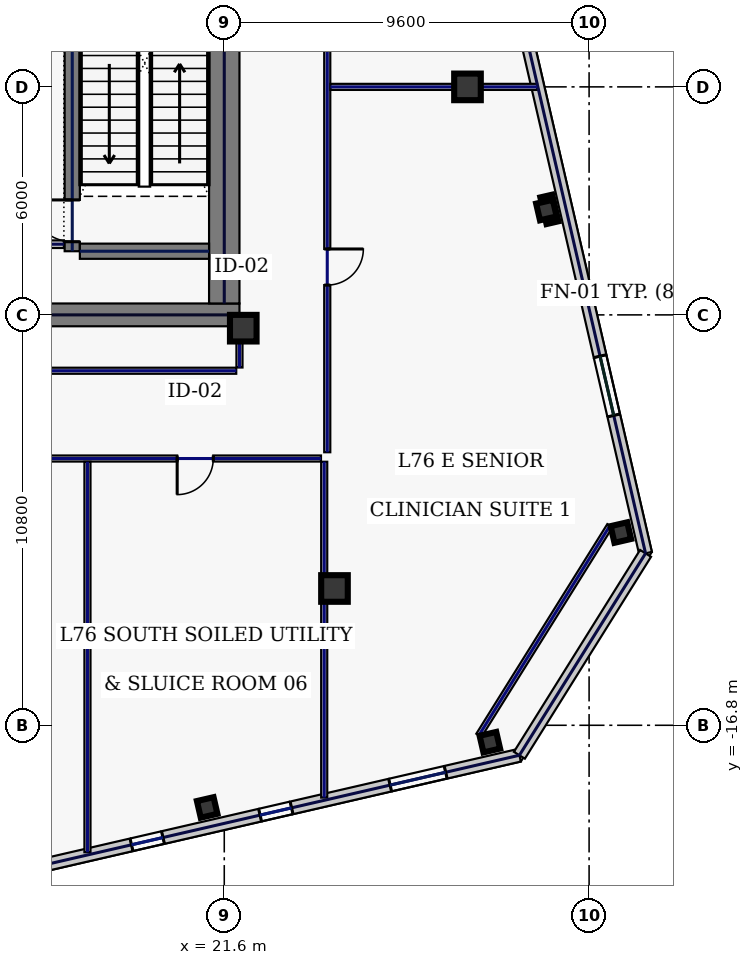
"""IFC4 building model, lengths in metres.
Left out: names, types, materials, properties, quantities, classifications, styles, units other than length and angle.
Written with IfcOpenShell. Run it as: python <this file> out.ifc"""

import sys

from ifc_helpers import new_model, si_unit, direction, frame, frame_2d, origin, origin_2d, place, context, subcontext, project, spatial, rectangle, hollow_rectangle, extrude, element, fill, save


model = new_model("IFC4")
c1 = context("Model", 3, precision=1e-05, world=origin(), true_north=direction((0.0, 1.0)))
c2 = subcontext(c1, "Body", "Model", "MODEL_VIEW")
j1 = project(units=[si_unit("LENGTHUNIT", "METRE"), si_unit("PLANEANGLEUNIT", "RADIAN")], contexts=[c1])
p1 = place(None, origin())
s1 = spatial("IfcSite", under=j1, at=p1, CompositionType="ELEMENT")
p2 = place(p1, origin())
s2 = spatial("IfcBuilding", under=s1, at=p2, CompositionType="ELEMENT")
p3 = place(p2, frame((0.0, 0.0, 325.0)))
s3 = spatial("IfcBuildingStorey", under=s2, at=p3, CompositionType="ELEMENT", Elevation=325.0)
p4 = place(p3, frame((10.5, -6.0, 0.0), z_axis=(0.0, 0.0, 1.0), x_axis=(1.0, 0.0, 0.0)))
e1 = element("IfcWall", 1, at=p4, inside=s3, PredefinedType="SHEAR", context=c2, shape_type="SweptSolid", body=[
    extrude(rectangle(XDim=11.5, YDim=0.6, at=frame_2d((5.75, 0.0))), origin(), (0.0, 0.0, 1.0), 3.74),
])
p5 = place(p3, frame((21.6, -5.7, 0.0), z_axis=(0.0, 0.0, 1.0), x_axis=(0.0, 1.0, 0.0)))
e2 = element("IfcWall", 2, at=p5, inside=s3, PredefinedType="SHEAR", context=c2, shape_type="SweptSolid", body=[
    extrude(rectangle(XDim=11.4, YDim=0.8, at=frame_2d((5.7, 0.0))), origin(), (0.0, 0.0, 1.0), 3.74),
])
p6 = place(p3, frame((17.6, -4.325, 0.0), z_axis=(0.0, 0.0, 1.0), x_axis=(0.0, 1.0, 0.0)))
e3 = element("IfcWall", 3, at=p6, inside=s3, PredefinedType="SHEAR", context=c2, shape_type="SweptSolid", body=[
    extrude(rectangle(XDim=8.65, YDim=0.4, at=frame_2d((4.325, 0.0))), origin(), (0.0, 0.0, 1.0), 3.74),
])
p7 = place(p6, frame((0.25, 0.0, 0.0)))
e4 = element("IfcOpeningElement", 4, at=p7, cuts=e3, PredefinedType="OPENING", context=c2, shape_type="SweptSolid", body=[
    extrude(rectangle(XDim=1.1, YDim=2.2, at=frame_2d((0.55, 1.1))), frame((0.0, 0.21, 0.0), z_axis=(0.0, -1.0, 0.0), x_axis=(1.0, 0.0, 0.0)), (0.0, 0.0, 1.0), 0.42),
])
p8 = place(p3, frame((17.8, -4.325, 0.0), z_axis=(0.0, 0.0, 1.0), x_axis=(1.0, 0.0, 0.0)))
e5 = element("IfcWall", 5, at=p8, inside=s3, PredefinedType="SHEAR", context=c2, shape_type="SweptSolid", body=[
    extrude(rectangle(XDim=3.4, YDim=0.4, at=frame_2d((1.7, 0.0))), origin(), (0.0, 0.0, 1.0), 3.74),
])
for number, where, z_axis, x_axis in (
    (6, (22.1, -6.35, 0.0), (0.0, 0.0, 1.0), (1.0, 0.0, 0.0)),
    (7, (24.5, -13.2, 0.0), (0.0, 0.0, 1.0), (1.0, 0.0, 0.0)),
    (8, (28.0, 0.0, 0.0), (0.0, 0.0, 1.0), (1.0, 0.0, 0.0)),
):
    element("IfcColumn", number, at=place(p3, frame(where, z_axis=z_axis, x_axis=x_axis)), inside=s3, PredefinedType="COLUMN", context=c2, shape_type="SweptSolid", body=[
        extrude(hollow_rectangle(XDim=0.7, YDim=0.7, WallThickness=0.032, at=origin_2d()), origin(), (0.0, 0.0, 1.0), 3.74),
    ])
for number, where, z_axis, x_axis in (
    (9, (21.15, -18.962, 0.0), (0.0, 0.0, 1.0), (0.974, 0.225, 0.0)),
    (10, (28.589, -17.245, 0.0), (0.0, 0.0, 1.0), (0.974, 0.225, 0.0)),
    (11, (32.036, -11.728, 0.0), (0.0, 0.0, 1.0), (0.974, 0.225, 0.0)),
    (12, (30.077, -3.241, 0.0), (0.0, 0.0, 1.0), (0.974, 0.225, 0.0)),
):
    element("IfcColumn", number, at=place(p3, frame(where, z_axis=z_axis, x_axis=x_axis)), inside=s3, PredefinedType="COLUMN", context=c2, shape_type="SweptSolid", body=[
        extrude(hollow_rectangle(XDim=0.45, YDim=0.45, WallThickness=0.022, at=origin_2d()), origin(), (0.0, 0.0, 1.0), 3.74),
    ])
p9 = place(p3, frame((12.445, -21.495, 0.0), z_axis=(0.0, 0.0, 1.0), x_axis=(0.974369392164, 0.224953967767, 0.0)))
e13 = element("IfcWall", 13, at=p9, inside=s3, PredefinedType="STANDARD", context=c2, shape_type="SweptSolid", body=[
    extrude(rectangle(XDim=17.366, YDim=0.34, at=frame_2d((8.683, 0.0))), origin(), (0.0, 0.0, 1.0), 3.74),
])
p10 = place(p9, frame((2.729, 0.0, 0.9)))
e14 = element("IfcOpeningElement", 14, at=p10, cuts=e13, PredefinedType="OPENING", context=c2, shape_type="SweptSolid", body=[
    extrude(rectangle(XDim=1.5, YDim=2.0, at=frame_2d((0.75, 1.0))), frame((0.0, 0.18, 0.0), z_axis=(0.0, -1.0, 0.0), x_axis=(1.0, 0.0, 0.0)), (0.0, 0.0, 1.0), 0.36),
])
p11 = place(p9, frame((6.89, 0.0, 0.9)))
e15 = element("IfcOpeningElement", 15, at=p11, cuts=e13, PredefinedType="OPENING", context=c2, shape_type="SweptSolid", body=[
    extrude(rectangle(XDim=0.85, YDim=1.85, at=frame_2d((0.425, 0.925))), frame((0.0, 0.18, 0.0), z_axis=(0.0, -1.0, 0.0), x_axis=(1.0, 0.0, 0.0)), (0.0, 0.0, 1.0), 0.36),
])
p12 = place(p9, frame((10.363, 0.0, 0.9)))
e16 = element("IfcOpeningElement", 16, at=p12, cuts=e13, PredefinedType="OPENING", context=c2, shape_type="SweptSolid", body=[
    extrude(rectangle(XDim=0.85, YDim=1.85, at=frame_2d((0.425, 0.925))), frame((0.0, 0.18, 0.0), z_axis=(0.0, -1.0, 0.0), x_axis=(1.0, 0.0, 0.0)), (0.0, 0.0, 1.0), 0.36),
])
p13 = place(p9, frame((13.875, 0.0, 0.9)))
e17 = element("IfcOpeningElement", 17, at=p13, cuts=e13, PredefinedType="OPENING", context=c2, shape_type="SweptSolid", body=[
    extrude(rectangle(XDim=1.5, YDim=2.0, at=frame_2d((0.75, 1.0))), frame((0.0, 0.18, 0.0), z_axis=(0.0, -1.0, 0.0), x_axis=(1.0, 0.0, 0.0)), (0.0, 0.0, 1.0), 0.36),
])
p14 = place(p3, frame((32.686, -12.276, 0.0), z_axis=(0.0, 0.0, 1.0), x_axis=(-0.224953091034, 0.974369594576, 0.0)))
e18 = element("IfcWall", 18, at=p14, inside=s3, PredefinedType="STANDARD", context=c2, shape_type="SweptSolid", body=[
    extrude(rectangle(XDim=36.2, YDim=0.34, at=frame_2d((18.1, 0.0))), origin(), (0.0, 0.0, 1.0), 3.74),
])
p15 = place(p14, frame((3.725, 0.0, 0.58)))
e19 = element("IfcOpeningElement", 19, at=p15, cuts=e18, PredefinedType="OPENING", context=c2, shape_type="SweptSolid", body=[
    extrude(rectangle(XDim=1.6, YDim=2.3, at=frame_2d((0.8, 1.15))), frame((0.0, 0.18, 0.0), z_axis=(0.0, -1.0, 0.0), x_axis=(1.0, 0.0, 0.0)), (0.0, 0.0, 1.0), 0.36),
])
p16 = place(p14, frame((13.875, 0.0, 0.75)))
e20 = element("IfcOpeningElement", 20, at=p16, cuts=e18, PredefinedType="OPENING", context=c2, shape_type="SweptSolid", body=[
    extrude(rectangle(XDim=0.85, YDim=1.85, at=frame_2d((0.425, 0.925))), frame((0.0, 0.18, 0.0), z_axis=(0.0, -1.0, 0.0), x_axis=(1.0, 0.0, 0.0)), (0.0, 0.0, 1.0), 0.36),
])
p17 = place(p14, frame((21.825, 0.0, 0.58)))
e21 = element("IfcOpeningElement", 21, at=p17, cuts=e18, PredefinedType="OPENING", context=c2, shape_type="SweptSolid", body=[
    extrude(rectangle(XDim=1.6, YDim=2.3, at=frame_2d((0.8, 1.15))), frame((0.0, 0.18, 0.0), z_axis=(0.0, -1.0, 0.0), x_axis=(1.0, 0.0, 0.0)), (0.0, 0.0, 1.0), 0.36),
])
p18 = place(p14, frame((30.875, 0.0, 0.58)))
e22 = element("IfcOpeningElement", 22, at=p18, cuts=e18, PredefinedType="OPENING", context=c2, shape_type="SweptSolid", body=[
    extrude(rectangle(XDim=1.6, YDim=2.3, at=frame_2d((0.8, 1.15))), frame((0.0, 0.18, 0.0), z_axis=(0.0, -1.0, 0.0), x_axis=(1.0, 0.0, 0.0)), (0.0, 0.0, 1.0), 0.36),
])
p19 = place(p3, frame((29.366, -17.589, 0.0), z_axis=(0.0, 0.0, 1.0), x_axis=(0.529907862057, 0.848055220921, 0.0)))
e23 = element("IfcWall", 23, at=p19, inside=s3, PredefinedType="STANDARD", context=c2, shape_type="SweptSolid", body=[
    extrude(rectangle(XDim=6.265, YDim=0.34, at=frame_2d((3.132, 0.0))), origin(), (0.0, 0.0, 1.0), 3.74),
])
p20 = place(p3, frame((14.825, -4.14, 0.0), z_axis=(0.0, 0.0, 1.0), x_axis=(1.0, 0.0, 0.0)))
e24 = element("IfcWall", 24, at=p20, inside=s3, PredefinedType="SOLIDWALL", context=c2, shape_type="SweptSolid", body=[
    extrude(rectangle(XDim=2.555, YDim=0.2, at=frame_2d((1.277, 0.0))), origin(), (0.0, 0.0, 1.0), 3.74),
])
p21 = place(p20, frame((0.88, 0.0, 0.0)))
e25 = element("IfcOpeningElement", 25, at=p21, cuts=e24, PredefinedType="OPENING", context=c2, shape_type="SweptSolid", body=[
    extrude(rectangle(XDim=0.95, YDim=2.2, at=frame_2d((0.475, 1.1))), frame((0.0, 0.11, 0.0), z_axis=(0.0, -1.0, 0.0), x_axis=(1.0, 0.0, 0.0)), (0.0, 0.0, 1.0), 0.22),
])
p22 = place(p3, frame((28.3, -17.065, 0.0), z_axis=(0.0, 0.0, 1.0), x_axis=(0.529914601736, 0.848051009591, 0.0)))
e26 = element("IfcWall", 26, at=p22, inside=s3, PredefinedType="PARTITIONING", context=c2, shape_type="SweptSolid", body=[
    extrude(rectangle(XDim=6.505, YDim=0.16, at=frame_2d((3.253, 0.0))), origin(), (0.0, 0.0, 1.0), 3.74),
])
p23 = place(p3, frame((24.31, 9.665, 0.0), z_axis=(0.0, 0.0, 1.0), x_axis=(0.0, -1.0, 0.0)))
e27 = element("IfcWall", 27, at=p23, inside=s3, PredefinedType="PARTITIONING", context=c2, shape_type="SweptSolid", body=[
    extrude(rectangle(XDim=19.28, YDim=0.16, at=frame_2d((9.64, 0.0))), origin(), (0.0, 0.0, 1.0), 3.74),
])
p24 = place(p23, frame((13.931, 0.0, 0.0)))
e28 = element("IfcOpeningElement", 28, at=p24, cuts=e27, PredefinedType="OPENING", context=c2, shape_type="SweptSolid", body=[
    extrude(rectangle(XDim=0.95, YDim=2.2, at=frame_2d((0.475, 1.1))), frame((0.0, 0.09, 0.0), z_axis=(0.0, -1.0, 0.0), x_axis=(1.0, 0.0, 0.0)), (0.0, 0.0, 1.0), 0.18),
])
p25 = place(p23, frame((4.594, 0.0, 0.0)))
e29 = element("IfcOpeningElement", 29, at=p25, cuts=e27, PredefinedType="OPENING", context=c2, shape_type="SweptSolid", body=[
    extrude(rectangle(XDim=0.95, YDim=2.2, at=frame_2d((0.475, 1.1))), frame((0.0, 0.09, 0.0), z_axis=(0.0, -1.0, 0.0), x_axis=(1.0, 0.0, 0.0)), (0.0, 0.0, 1.0), 0.18),
])
p26 = place(p3, frame((24.145, -9.78, 0.0), z_axis=(0.0, 0.0, 1.0), x_axis=(-1.0, 0.0, 0.0)))
e30 = element("IfcWall", 30, at=p26, inside=s3, PredefinedType="PARTITIONING", context=c2, shape_type="SweptSolid", body=[
    extrude(rectangle(XDim=9.08, YDim=0.16, at=frame_2d((4.54, 0.0))), origin(), (0.0, 0.0, 1.0), 3.74),
])
p27 = place(p26, frame((2.834, 0.0, 0.0)))
e31 = element("IfcOpeningElement", 31, at=p27, cuts=e30, PredefinedType="OPENING", context=c2, shape_type="SweptSolid", body=[
    extrude(rectangle(XDim=0.95, YDim=2.2, at=frame_2d((0.475, 1.1))), frame((0.0, 0.09, 0.0), z_axis=(0.0, -1.0, 0.0), x_axis=(1.0, 0.0, 0.0)), (0.0, 0.0, 1.0), 0.18),
])
p28 = place(p3, frame((10.715, -7.47, 0.0), z_axis=(0.0, 0.0, 1.0), x_axis=(1.0, 0.0, 0.0)))
e32 = element("IfcWall", 32, at=p28, inside=s3, PredefinedType="PARTITIONING", context=c2, shape_type="SweptSolid", body=[
    extrude(rectangle(XDim=11.2, YDim=0.16, at=frame_2d((5.6, 0.0))), origin(), (0.0, 0.0, 1.0), 3.74),
])
p29 = place(p3, frame((22.0, -7.385, 0.0), z_axis=(0.0, 0.0, 1.0), x_axis=(0.0, 1.0, 0.0)))
e33 = element("IfcWall", 33, at=p29, inside=s3, PredefinedType="PARTITIONING", context=c2, shape_type="SweptSolid", body=[
    extrude(rectangle(XDim=0.965, YDim=0.16, at=frame_2d((0.482, 0.0))), origin(), (0.0, 0.0, 1.0), 3.74),
])
p30 = place(p3, frame((24.23, -18.703, 0.0), z_axis=(0.0, 0.0, 1.0), x_axis=(0.0, 1.0, 0.0)))
e34 = element("IfcWall", 34, at=p30, inside=s3, PredefinedType="PARTITIONING", context=c2, shape_type="SweptSolid", body=[
    extrude(rectangle(XDim=8.838, YDim=0.16, at=frame_2d((4.419, 0.0))), origin(), (0.0, 0.0, 1.0), 3.74),
])
p31 = place(p3, frame((18.0, -20.141, 0.0), z_axis=(0.0, 0.0, 1.0), x_axis=(0.0, 1.0, 0.0)))
e35 = element("IfcWall", 35, at=p31, inside=s3, PredefinedType="PARTITIONING", context=c2, shape_type="SweptSolid", body=[
    extrude(rectangle(XDim=10.276, YDim=0.16, at=frame_2d((5.138, 0.0))), origin(), (0.0, 0.0, 1.0), 3.74),
])
p32 = place(p3, frame((24.395, 0.0, 0.0), z_axis=(0.0, 0.0, 1.0), x_axis=(1.0, 0.0, 0.0)))
e36 = element("IfcWall", 36, at=p32, inside=s3, PredefinedType="PARTITIONING", context=c2, shape_type="SweptSolid", body=[
    extrude(rectangle(XDim=5.436, YDim=0.16, at=frame_2d((2.718, 0.0))), origin(), (0.0, 0.0, 1.0), 3.74),
])
p33 = place(p11, origin())
e37 = element("IfcWindow", 37, at=p33, inside=s3, PartitioningType="SINGLE_PANEL", PredefinedType="WINDOW", context=c2, shape_type="SweptSolid", body=[
    extrude(rectangle(XDim=0.85, YDim=1.85, at=frame_2d((0.425, 0.925))), frame((0.0, 0.03, 0.0), z_axis=(0.0, -1.0, 0.0), x_axis=(1.0, 0.0, 0.0)), (0.0, 0.0, 1.0), 0.06),
])
fill(e15, e37)
p34 = place(p12, origin())
e38 = element("IfcWindow", 38, at=p34, inside=s3, PartitioningType="SINGLE_PANEL", PredefinedType="WINDOW", context=c2, shape_type="SweptSolid", body=[
    extrude(rectangle(XDim=0.85, YDim=1.85, at=frame_2d((0.425, 0.925))), frame((0.0, 0.03, 0.0), z_axis=(0.0, -1.0, 0.0), x_axis=(1.0, 0.0, 0.0)), (0.0, 0.0, 1.0), 0.06),
])
fill(e16, e38)
p35 = place(p13, origin())
e39 = element("IfcWindow", 39, at=p35, inside=s3, PartitioningType="SINGLE_PANEL", PredefinedType="WINDOW", context=c2, shape_type="SweptSolid", body=[
    extrude(rectangle(XDim=1.5, YDim=2.0, at=frame_2d((0.75, 1.0))), frame((0.0, 0.03, 0.0), z_axis=(0.0, -1.0, 0.0), x_axis=(1.0, 0.0, 0.0)), (0.0, 0.0, 1.0), 0.06),
])
fill(e17, e39)
p36 = place(p15, origin())
e40 = element("IfcWindow", 40, at=p36, inside=s3, PartitioningType="SINGLE_PANEL", PredefinedType="WINDOW", context=c2, shape_type="SweptSolid", body=[
    extrude(rectangle(XDim=1.6, YDim=2.3, at=frame_2d((0.8, 1.15))), frame((0.0, 0.03, 0.0), z_axis=(0.0, -1.0, 0.0), x_axis=(1.0, 0.0, 0.0)), (0.0, 0.0, 1.0), 0.06),
])
fill(e19, e40)
p37 = place(p7, origin())
e41 = element("IfcDoor", 41, at=p37, inside=s3, OperationType="SINGLE_SWING_RIGHT", PredefinedType="DOOR", context=c2, shape_type="SweptSolid", body=[
    extrude(rectangle(XDim=1.1, YDim=2.2, at=frame_2d((0.55, 1.1))), frame((0.0, 0.025, 0.0), z_axis=(0.0, -1.0, 0.0), x_axis=(1.0, 0.0, 0.0)), (0.0, 0.0, 1.0), 0.05),
])
fill(e4, e41)
p38 = place(p27, origin())
e42 = element("IfcDoor", 42, at=p38, inside=s3, OperationType="SINGLE_SWING_RIGHT", PredefinedType="DOOR", context=c2, shape_type="SweptSolid", body=[
    extrude(rectangle(XDim=0.95, YDim=2.2, at=frame_2d((0.475, 1.1))), frame((0.0, 0.025, 0.0), z_axis=(0.0, -1.0, 0.0), x_axis=(1.0, 0.0, 0.0)), (0.0, 0.0, 1.0), 0.05),
])
fill(e31, e42)
p39 = place(p24, origin())
e43 = element("IfcDoor", 43, at=p39, inside=s3, OperationType="SINGLE_SWING_LEFT", PredefinedType="DOOR", context=c2, shape_type="SweptSolid", body=[
    extrude(rectangle(XDim=0.95, YDim=2.2, at=frame_2d((0.475, 1.1))), frame((0.0, 0.025, 0.0), z_axis=(0.0, -1.0, 0.0), x_axis=(1.0, 0.0, 0.0)), (0.0, 0.0, 1.0), 0.05),
])
fill(e28, e43)
save(model, sys.argv[1])
